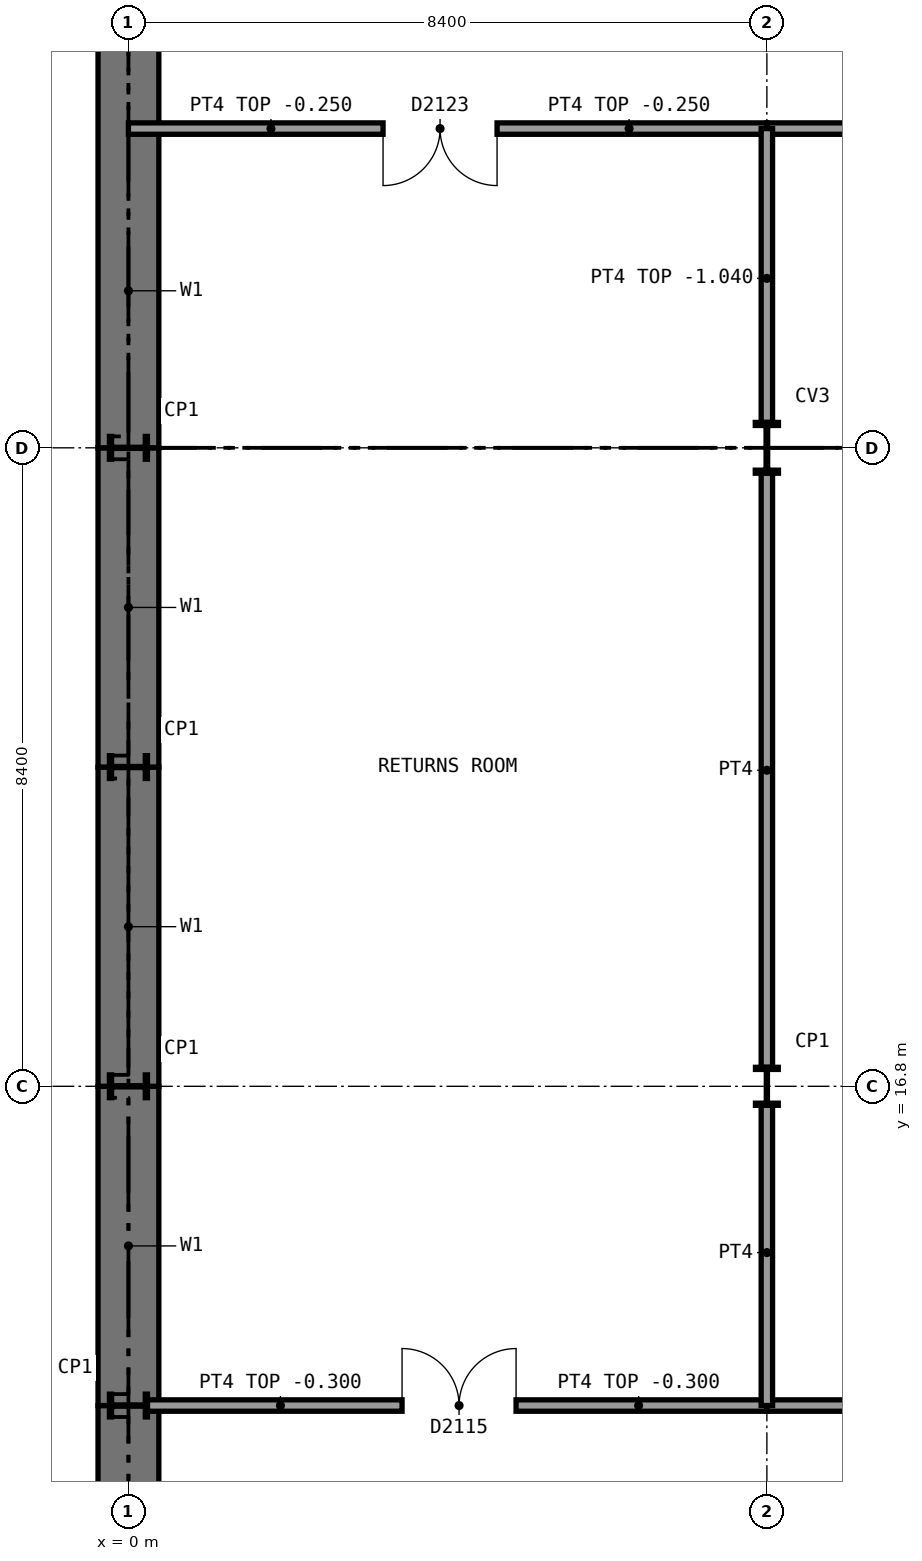
"""IFC4 building model, lengths in metres.
Left out: names, types, materials, properties, quantities, classifications, styles, units other than length and angle.
Written with IfcOpenShell. Run it as: python <this file> out.ifc"""

import sys

from ifc_helpers import new_model, si_unit, direction, frame, frame_2d, origin, origin_2d, place, context, subcontext, project, spatial, rectangle, i_section, extrude, element, fill, save


model = new_model("IFC4")
c1 = context("Model", 3, precision=1e-05, world=origin(), true_north=direction((0.0, 1.0)))
c2 = subcontext(c1, "Body", "Model", "MODEL_VIEW")
j1 = project(units=[si_unit("LENGTHUNIT", "METRE"), si_unit("PLANEANGLEUNIT", "RADIAN")], contexts=[c1])
p1 = place(None, origin())
s1 = spatial("IfcSite", under=j1, at=p1, CompositionType="ELEMENT")
p2 = place(p1, origin())
s2 = spatial("IfcBuilding", under=s1, at=p2, CompositionType="ELEMENT")
p3 = place(p2, frame((0.0, 0.0, -4.9)))
s3 = spatial("IfcBuildingStorey", under=s2, at=p3, CompositionType="ELEMENT", Elevation=-4.9)
p4 = place(p3, frame((0.0, 8.4, 0.0), z_axis=(0.0, 0.0, 1.0), x_axis=(0.0, 1.0, 0.0)))
e1 = element("IfcWall", 1, at=p4, inside=s3, PredefinedType="SOLIDWALL", context=c2, shape_type="SweptSolid", body=[
    extrude(rectangle(XDim=4.2, YDim=0.8, at=frame_2d((2.1, 0.0))), origin(), (0.0, 0.0, 1.0), 4.75),
])
for number, where, z_axis, x_axis in (
    (2, (0.0, 12.6, 0.0), (0.0, 0.0, 1.0), (0.0, 1.0, 0.0)),
    (3, (0.0, 16.8, 0.0), (0.0, 0.0, 1.0), (0.0, 1.0, 0.0)),
    (4, (0.0, 21.0, 0.0), (0.0, 0.0, 1.0), (0.0, 1.0, 0.0)),
):
    element("IfcWall", number, at=place(p3, frame(where, z_axis=z_axis, x_axis=x_axis)), inside=s3, PredefinedType="SOLIDWALL", context=c2, shape_type="SweptSolid", body=[
        extrude(rectangle(XDim=4.2, YDim=0.8, at=frame_2d((2.1, 0.0))), origin(), (0.0, 0.0, 1.0), 4.75),
    ])
p5 = place(p3, frame((0.0, 25.2, 0.0), z_axis=(0.0, 0.0, 1.0), x_axis=(0.0, 1.0, 0.0)))
e5 = element("IfcWall", 5, at=p5, inside=s3, PredefinedType="SOLIDWALL", context=c2, shape_type="SweptSolid", body=[
    extrude(rectangle(XDim=12.6, YDim=0.8, at=frame_2d((6.3, 0.0))), origin(), (0.0, 0.0, 1.0), 4.75),
])
for number, where, z_axis, x_axis in (
    (6, (0.0, 12.6, 0.0), (0.0, 0.0, 1.0), (0.0, 1.0, 0.0)),
    (7, (0.0, 16.8, 0.0), (0.0, 0.0, 1.0), (0.0, 1.0, 0.0)),
    (8, (0.0, 21.0, 0.0), (0.0, 0.0, 1.0), (0.0, 1.0, 0.0)),
    (9, (0.0, 25.2, 0.0), (0.0, 0.0, 1.0), (0.0, 1.0, 0.0)),
    (10, (8.4, 16.8, 0.0), (0.0, 0.0, 1.0), (1.0, 0.0, 0.0)),
):
    element("IfcColumn", number, at=place(p3, frame(where, z_axis=z_axis, x_axis=x_axis)), inside=s3, PredefinedType="COLUMN", context=c2, shape_type="SweptSolid", body=[
        extrude(i_section(OverallWidth=0.3, OverallDepth=0.5, WebThickness=0.014, FlangeThickness=0.028, FilletRadius=0.027, at=origin_2d()), origin(), (0.0, 0.0, 1.0), 4.9),
    ])
p6 = place(p3, frame((8.4, 25.2, 0.0), z_axis=(0.0, 0.0, 1.0), x_axis=(1.0, 0.0, 0.0)))
e11 = element("IfcColumn", 11, at=p6, inside=s3, PredefinedType="COLUMN", context=c2, shape_type="SweptSolid", body=[
    extrude(i_section(OverallWidth=0.305, OverallDepth=0.668, WebThickness=0.021, FlangeThickness=0.04, FilletRadius=0.027, at=origin_2d()), origin(), (0.0, 0.0, 1.0), 4.9),
])
p7 = place(p3, frame((0.25, 12.6, 0.0), z_axis=(0.0, 0.0, 1.0), x_axis=(1.0, 0.0, 0.0)))
e12 = element("IfcWall", 12, at=p7, inside=s3, PredefinedType="SOLIDWALL", context=c2, shape_type="SweptSolid", body=[
    extrude(rectangle(XDim=8.15, YDim=0.15, at=frame_2d((4.075, 0.0))), origin(), (0.0, 0.0, 1.0), 4.6),
])
p8 = place(p7, frame((3.35, 0.0, 0.0)))
e13 = element("IfcOpeningElement", 13, at=p8, cuts=e12, PredefinedType="OPENING", context=c2, shape_type="SweptSolid", body=[
    extrude(rectangle(XDim=1.5, YDim=2.1, at=frame_2d((0.75, 1.05))), frame((0.0, 0.085, 0.0), z_axis=(0.0, -1.0, 0.0), x_axis=(1.0, 0.0, 0.0)), (0.0, 0.0, 1.0), 0.17),
])
p9 = place(p3, frame((8.4, 12.6, 0.0), z_axis=(0.0, 0.0, 1.0), x_axis=(1.0, 0.0, 0.0)))
e14 = element("IfcWall", 14, at=p9, inside=s3, PredefinedType="SOLIDWALL", context=c2, shape_type="SweptSolid", body=[
    extrude(rectangle(XDim=16.8, YDim=0.15, at=frame_2d((8.4, 0.0))), origin(), (0.0, 0.0, 1.0), 4.6),
])
p10 = place(p9, frame((7.6, 0.0, 0.0)))
e15 = element("IfcOpeningElement", 15, at=p10, cuts=e14, PredefinedType="OPENING", context=c2, shape_type="SweptSolid", body=[
    extrude(rectangle(XDim=1.5, YDim=2.1, at=frame_2d((0.75, 1.05))), frame((0.0, 0.085, 0.0), z_axis=(0.0, -1.0, 0.0), x_axis=(1.0, 0.0, 0.0)), (0.0, 0.0, 1.0), 0.17),
])
p11 = place(p3, frame((0.0, 29.4, 0.0), z_axis=(0.0, 0.0, 1.0), x_axis=(1.0, 0.0, 0.0)))
e16 = element("IfcWall", 16, at=p11, inside=s3, PredefinedType="SOLIDWALL", context=c2, shape_type="SweptSolid", body=[
    extrude(rectangle(XDim=8.4, YDim=0.15, at=frame_2d((4.2, 0.0))), origin(), (0.0, 0.0, 1.0), 4.65),
])
p12 = place(p11, frame((3.35, 0.0, 0.0)))
e17 = element("IfcOpeningElement", 17, at=p12, cuts=e16, PredefinedType="OPENING", context=c2, shape_type="SweptSolid", body=[
    extrude(rectangle(XDim=1.5, YDim=2.1, at=frame_2d((0.75, 1.05))), frame((0.0, 0.085, 0.0), z_axis=(0.0, -1.0, 0.0), x_axis=(1.0, 0.0, 0.0)), (0.0, 0.0, 1.0), 0.17),
])
p13 = place(p3, frame((8.4, 29.4, 0.0), z_axis=(0.0, 0.0, 1.0), x_axis=(1.0, 0.0, 0.0)))
e18 = element("IfcWall", 18, at=p13, inside=s3, PredefinedType="SOLIDWALL", context=c2, shape_type="SweptSolid", body=[
    extrude(rectangle(XDim=16.8, YDim=0.15, at=frame_2d((8.4, 0.0))), origin(), (0.0, 0.0, 1.0), 4.65),
])
p14 = place(p13, frame((7.6, 0.0, 0.0)))
e19 = element("IfcOpeningElement", 19, at=p14, cuts=e18, PredefinedType="OPENING", context=c2, shape_type="SweptSolid", body=[
    extrude(rectangle(XDim=1.5, YDim=2.1, at=frame_2d((0.75, 1.05))), frame((0.0, 0.085, 0.0), z_axis=(0.0, -1.0, 0.0), x_axis=(1.0, 0.0, 0.0)), (0.0, 0.0, 1.0), 0.17),
])
p15 = place(p3, frame((8.4, 12.6, 0.0), z_axis=(0.0, 0.0, 1.0), x_axis=(0.0, 1.0, 0.0)))
e20 = element("IfcWall", 20, at=p15, inside=s3, PredefinedType="SOLIDWALL", context=c2, shape_type="SweptSolid", body=[
    extrude(rectangle(XDim=3.95, YDim=0.15, at=frame_2d((1.975, 0.0))), origin(), (0.0, 0.0, 1.0), 4.26),
])
p16 = place(p3, frame((8.4, 17.05, 0.0), z_axis=(0.0, 0.0, 1.0), x_axis=(0.0, 1.0, 0.0)))
e21 = element("IfcWall", 21, at=p16, inside=s3, PredefinedType="SOLIDWALL", context=c2, shape_type="SweptSolid", body=[
    extrude(rectangle(XDim=7.816, YDim=0.15, at=frame_2d((3.908, 0.0))), origin(), (0.0, 0.0, 1.0), 4.26),
])
p17 = place(p3, frame((8.4, 25.534, 0.0), z_axis=(0.0, 0.0, 1.0), x_axis=(0.0, 1.0, 0.0)))
e22 = element("IfcWall", 22, at=p17, inside=s3, PredefinedType="SOLIDWALL", context=c2, shape_type="SweptSolid", body=[
    extrude(rectangle(XDim=3.866, YDim=0.15, at=frame_2d((1.933, 0.0))), origin(), (0.0, 0.0, 1.0), 3.86),
])
p18 = place(p8, origin())
e23 = element("IfcDoor", 23, at=p18, inside=s3, OperationType="DOUBLE_DOOR_SINGLE_SWING", PredefinedType="DOOR", context=c2, shape_type="SweptSolid", body=[
    extrude(rectangle(XDim=1.5, YDim=2.1, at=frame_2d((0.75, 1.05))), frame((0.0, 0.025, 0.0), z_axis=(0.0, -1.0, 0.0), x_axis=(1.0, 0.0, 0.0)), (0.0, 0.0, 1.0), 0.05),
])
fill(e13, e23)
p19 = place(p12, frame((1.5, 0.0, 0.0), z_axis=(0.0, 0.0, 1.0), x_axis=(-1.0, 0.0, 0.0)))
e24 = element("IfcDoor", 24, at=p19, inside=s3, OperationType="DOUBLE_DOOR_SINGLE_SWING", PredefinedType="DOOR", context=c2, shape_type="SweptSolid", body=[
    extrude(rectangle(XDim=1.5, YDim=2.1, at=frame_2d((0.75, 1.05))), frame((0.0, 0.025, 0.0), z_axis=(0.0, -1.0, 0.0), x_axis=(1.0, 0.0, 0.0)), (0.0, 0.0, 1.0), 0.05),
])
fill(e17, e24)
save(model, sys.argv[1])
